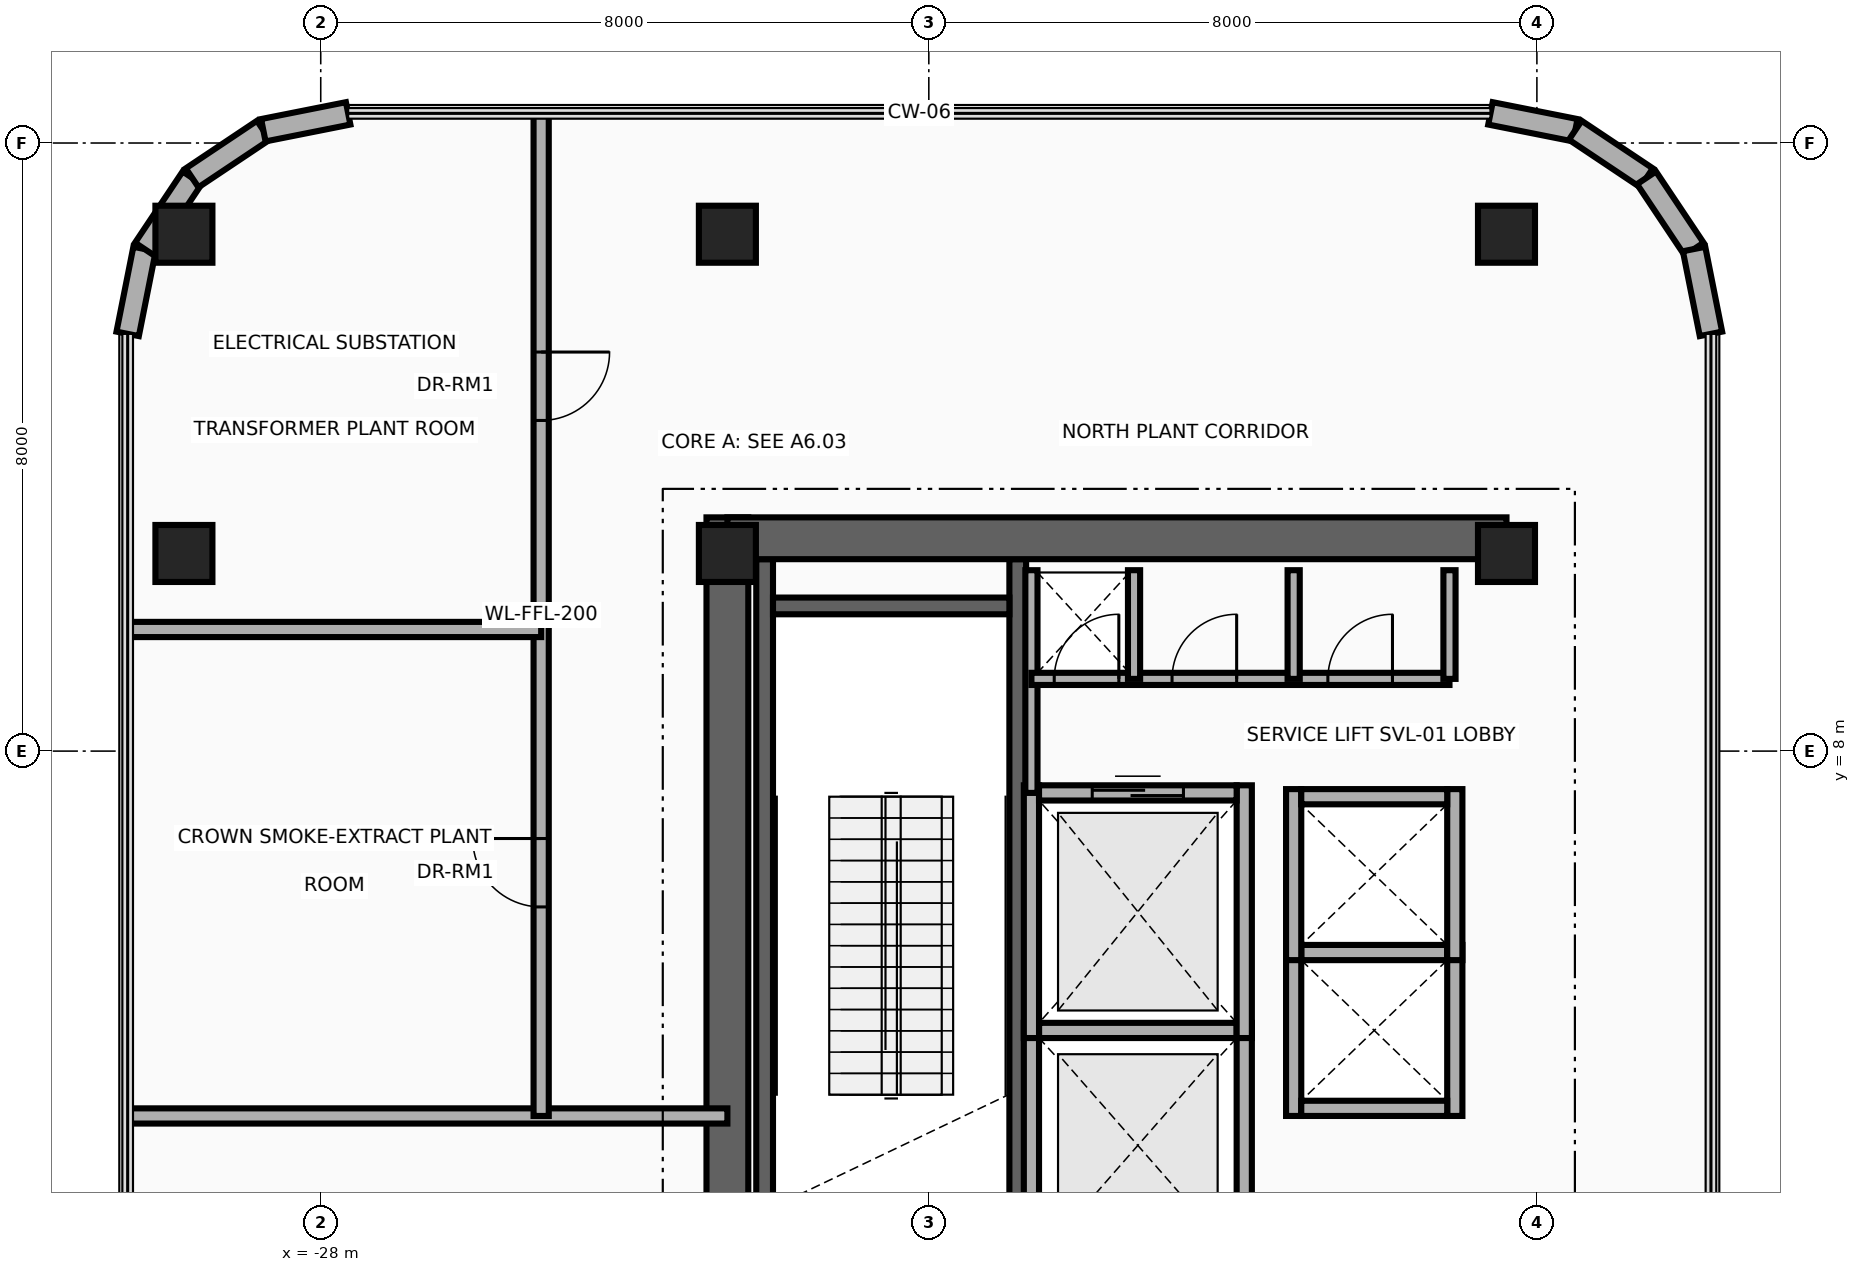
"""IFC4 building model, lengths in metres.
Left out: names, types, materials, properties, quantities, classifications, styles, units other than length and angle.
Written with IfcOpenShell. Run it as: python <this file> out.ifc"""

import sys

from ifc_helpers import new_model, si_unit, direction, frame, frame_2d, origin, origin_2d, place, context, subcontext, project, spatial, rectangle, extrude, source, transform, mapped, element, fill, save


model = new_model("IFC4")
c1 = context("Model", 3, precision=1e-05, world=origin(), true_north=direction((0.0, 1.0)))
c2 = subcontext(c1, "Body", "Model", "MODEL_VIEW")
j1 = project(units=[si_unit("LENGTHUNIT", "METRE"), si_unit("PLANEANGLEUNIT", "RADIAN")], contexts=[c1])
p1 = place(None, origin())
s1 = spatial("IfcSite", under=j1, at=p1, CompositionType="ELEMENT")
p2 = place(p1, origin())
s2 = spatial("IfcBuilding", under=s1, at=p2, CompositionType="ELEMENT")
p3 = place(p2, frame((0.0, 0.0, 294.2)))
s3 = spatial("IfcBuildingStorey", under=s2, at=p3, CompositionType="ELEMENT", Elevation=294.2)
for number, where, z_axis, x_axis in (
    (1, (-22.16, 1.78, 0.0), (0.0, 0.0, 1.0), (0.0, 1.0, 0.0)),
    (2, (-18.83, 1.78, 0.0), (0.0, 0.0, 1.0), (0.0, 1.0, 0.0)),
):
    element("IfcWall", number, at=place(p3, frame(where, z_axis=z_axis, x_axis=x_axis)), inside=s3, PredefinedType="SHEAR", context=c2, shape_type="SweptSolid", body=[
        extrude(rectangle(XDim=8.745, YDim=0.22, at=frame_2d((4.373, 0.0))), origin(), (0.0, 0.0, 1.0), 4.96),
    ])
p4 = place(p3, frame((-22.05, 9.91, 0.0), z_axis=(0.0, 0.0, 1.0), x_axis=(1.0, 0.0, 0.0)))
e3 = element("IfcWall", 3, at=p4, inside=s3, PredefinedType="SHEAR", context=c2, shape_type="SweptSolid", body=[
    extrude(rectangle(XDim=3.11, YDim=0.22, at=frame_2d((1.555, 0.0))), origin(), (0.0, 0.0, 1.0), 4.96),
])
p5 = place(p3, frame((-22.65, -11.075, 0.0), z_axis=(0.0, 0.0, 1.0), x_axis=(0.0, 1.0, 0.0)))
e4 = element("IfcWall", 4, at=p5, inside=s3, PredefinedType="SHEAR", context=c2, shape_type="SweptSolid", body=[
    extrude(rectangle(XDim=22.15, YDim=0.55, at=frame_2d((11.075, 0.0))), origin(), (0.0, 0.0, 1.0), 4.96),
])
p6 = place(p3, frame((-22.65, 10.8, 0.0), z_axis=(0.0, 0.0, 1.0), x_axis=(1.0, 0.0, 0.0)))
e5 = element("IfcWall", 5, at=p6, inside=s3, PredefinedType="SHEAR", context=c2, shape_type="SweptSolid", body=[
    extrude(rectangle(XDim=10.25, YDim=0.55, at=frame_2d((5.125, 0.0))), origin(), (0.0, 0.0, 1.0), 4.96),
])
m1 = source(origin(), c2, "Body", "SweptSolid", [
    extrude(rectangle(XDim=0.75, YDim=0.75, at=origin_2d()), origin(), (0.0, 0.0, 1.0), 5.2),
])
for number, where, z_axis, x_axis in (
    (6, (-29.8, 10.6, 0.0), (0.0, 0.0, 1.0), (1.0, 0.0, 0.0)),
    (7, (-22.65, 10.6, 0.0), (0.0, 0.0, 1.0), (1.0, 0.0, 0.0)),
    (8, (-12.4, 10.6, 0.0), (0.0, 0.0, 1.0), (1.0, 0.0, 0.0)),
    (9, (-29.8, 14.8, 0.0), (0.0, 0.0, 1.0), (1.0, 0.0, 0.0)),
    (10, (-22.65, 14.8, 0.0), (0.0, 0.0, 1.0), (1.0, 0.0, 0.0)),
    (11, (-12.4, 14.8, 0.0), (0.0, 0.0, 1.0), (1.0, 0.0, 0.0)),
):
    element("IfcColumn", number, at=place(p3, frame(where, z_axis=z_axis, x_axis=x_axis)), inside=s3, PredefinedType="COLUMN", context=c2, shape_type="MappedRepresentation", body=[
        mapped(m1, transform((0.0, 0.0, 0.0), x_axis=(1.0, 0.0, 0.0), y_axis=(0.0, 1.0, 0.0), z_axis=(0.0, 0.0, 1.0), scale=1.0)),
    ])
p7 = place(p3, frame((-30.54, 13.489, 0.0), z_axis=(0.0, 0.0, 1.0), x_axis=(0.195043173023, 0.980794657743, 0.0)))
e12 = element("IfcWall", 12, at=p7, inside=s3, PredefinedType="SOLIDWALL", context=c2, shape_type="SweptSolid", body=[
    extrude(rectangle(XDim=1.138, YDim=0.3, at=frame_2d((0.569, 0.0))), origin(), (0.0, 0.0, 1.0), 4.96),
])
for number, where, z_axis, x_axis in (
    (13, (-30.318, 14.605, 0.0), (0.0, 0.0, 1.0), (0.556, 0.831, 0.0)),
    (14, (-29.692, 15.542, 0.0), (0.0, 0.0, 1.0), (0.831, 0.556, 0.0)),
):
    element("IfcWall", number, at=place(p3, frame(where, z_axis=z_axis, x_axis=x_axis)), inside=s3, PredefinedType="SOLIDWALL", context=c2, shape_type="SweptSolid", body=[
        extrude(rectangle(XDim=1.127, YDim=0.3, at=frame_2d((0.563, 0.0))), origin(), (0.0, 0.0, 1.0), 4.96),
    ])
for number, where, z_axis, x_axis in (
    (15, (-28.755, 16.168, 0.0), (0.0, 0.0, 1.0), (0.981, 0.195, 0.0)),
    (16, (-12.611, 16.39, 0.0), (0.0, 0.0, 1.0), (0.981, -0.195, 0.0)),
):
    element("IfcWall", number, at=place(p3, frame(where, z_axis=z_axis, x_axis=x_axis)), inside=s3, PredefinedType="SOLIDWALL", context=c2, shape_type="SweptSolid", body=[
        extrude(rectangle(XDim=1.138, YDim=0.3, at=frame_2d((0.569, 0.0))), origin(), (0.0, 0.0, 1.0), 4.96),
    ])
for number, where, z_axis, x_axis in (
    (17, (-11.495, 16.168, 0.0), (0.0, 0.0, 1.0), (0.831, -0.556, 0.0)),
    (18, (-10.558, 15.542, 0.0), (0.0, 0.0, 1.0), (0.556, -0.831, 0.0)),
):
    element("IfcWall", number, at=place(p3, frame(where, z_axis=z_axis, x_axis=x_axis)), inside=s3, PredefinedType="SOLIDWALL", context=c2, shape_type="SweptSolid", body=[
        extrude(rectangle(XDim=1.127, YDim=0.3, at=frame_2d((0.563, 0.0))), origin(), (0.0, 0.0, 1.0), 4.96),
    ])
p8 = place(p3, frame((-9.932, 14.605, 0.0), z_axis=(0.0, 0.0, 1.0), x_axis=(0.195043173023, -0.980794657743, 0.0)))
e19 = element("IfcWall", 19, at=p8, inside=s3, PredefinedType="SOLIDWALL", context=c2, shape_type="SweptSolid", body=[
    extrude(rectangle(XDim=1.138, YDim=0.3, at=frame_2d((0.569, 0.0))), origin(), (0.0, 0.0, 1.0), 4.96),
])
for number, where, z_axis, x_axis in (
    (20, (-18.65, 1.2, 0.0), (0.0, 0.0, 1.0), (0.0, 1.0, 0.0)),
    (21, (-15.85, 1.2, 0.0), (0.0, 0.0, 1.0), (0.0, 1.0, 0.0)),
):
    element("IfcWall", number, at=place(p3, frame(where, z_axis=z_axis, x_axis=x_axis)), inside=s3, PredefinedType="MOVABLE", context=c2, shape_type="SweptSolid", body=[
        extrude(rectangle(XDim=3.225, YDim=0.2, at=frame_2d((1.613, 0.0))), origin(), (0.0, 0.0, 1.0), 4.96),
    ])
p9 = place(p3, frame((-18.55, 4.325, 0.0), z_axis=(0.0, 0.0, 1.0), x_axis=(1.0, 0.0, 0.0)))
e22 = element("IfcWall", 22, at=p9, inside=s3, PredefinedType="MOVABLE", context=c2, shape_type="SweptSolid", body=[
    extrude(rectangle(XDim=2.6, YDim=0.2, at=frame_2d((1.3, 0.0))), origin(), (0.0, 0.0, 1.0), 4.96),
])
for number, where, z_axis, x_axis in (
    (23, (-18.65, 4.225, 0.0), (0.0, 0.0, 1.0), (0.0, 1.0, 0.0)),
    (24, (-15.85, 4.225, 0.0), (0.0, 0.0, 1.0), (0.0, 1.0, 0.0)),
):
    element("IfcWall", number, at=place(p3, frame(where, z_axis=z_axis, x_axis=x_axis)), inside=s3, PredefinedType="MOVABLE", context=c2, shape_type="SweptSolid", body=[
        extrude(rectangle(XDim=3.325, YDim=0.2, at=frame_2d((1.663, 0.0))), origin(), (0.0, 0.0, 1.0), 4.96),
    ])
p10 = place(p3, frame((-18.55, 7.45, 0.0), z_axis=(0.0, 0.0, 1.0), x_axis=(1.0, 0.0, 0.0)))
e25 = element("IfcWall", 25, at=p10, inside=s3, PredefinedType="MOVABLE", context=c2, shape_type="SweptSolid", body=[
    extrude(rectangle(XDim=2.6, YDim=0.2, at=frame_2d((1.3, 0.0))), origin(), (0.0, 0.0, 1.0), 4.96),
])
p11 = place(p10, frame((0.7, 0.0, 0.0)))
e26 = element("IfcOpeningElement", 26, at=p11, cuts=e25, PredefinedType="OPENING", context=c2, shape_type="SweptSolid", body=[
    extrude(rectangle(XDim=1.2, YDim=2.1, at=frame_2d((0.6, 1.05))), frame((0.0, 0.115, 0.0), z_axis=(0.0, -1.0, 0.0), x_axis=(1.0, 0.0, 0.0)), (0.0, 0.0, 1.0), 0.23),
])
for number, where, z_axis, x_axis in (
    (27, (-15.2, 3.2, 0.0), (0.0, 0.0, 1.0), (0.0, 1.0, 0.0)),
    (28, (-13.08, 3.2, 0.0), (0.0, 0.0, 1.0), (0.0, 1.0, 0.0)),
):
    element("IfcWall", number, at=place(p3, frame(where, z_axis=z_axis, x_axis=x_axis)), inside=s3, PredefinedType="MOVABLE", context=c2, shape_type="SweptSolid", body=[
        extrude(rectangle(XDim=2.25, YDim=0.2, at=frame_2d((1.125, 0.0))), origin(), (0.0, 0.0, 1.0), 4.96),
    ])
for number, where, z_axis, x_axis in (
    (29, (-15.1, 3.3, 0.0), (0.0, 0.0, 1.0), (1.0, 0.0, 0.0)),
    (30, (-15.1, 5.35, 0.0), (0.0, 0.0, 1.0), (1.0, 0.0, 0.0)),
):
    element("IfcWall", number, at=place(p3, frame(where, z_axis=z_axis, x_axis=x_axis)), inside=s3, PredefinedType="MOVABLE", context=c2, shape_type="SweptSolid", body=[
        extrude(rectangle(XDim=1.92, YDim=0.2, at=frame_2d((0.96, 0.0))), origin(), (0.0, 0.0, 1.0), 4.96),
    ])
for number, where, z_axis, x_axis in (
    (31, (-15.2, 5.25, 0.0), (0.0, 0.0, 1.0), (0.0, 1.0, 0.0)),
    (32, (-13.08, 5.25, 0.0), (0.0, 0.0, 1.0), (0.0, 1.0, 0.0)),
):
    element("IfcWall", number, at=place(p3, frame(where, z_axis=z_axis, x_axis=x_axis)), inside=s3, PredefinedType="MOVABLE", context=c2, shape_type="SweptSolid", body=[
        extrude(rectangle(XDim=2.25, YDim=0.2, at=frame_2d((1.125, 0.0))), origin(), (0.0, 0.0, 1.0), 4.96),
    ])
p12 = place(p3, frame((-15.1, 7.4, 0.0), z_axis=(0.0, 0.0, 1.0), x_axis=(1.0, 0.0, 0.0)))
e33 = element("IfcWall", 33, at=p12, inside=s3, PredefinedType="MOVABLE", context=c2, shape_type="SweptSolid", body=[
    extrude(rectangle(XDim=1.92, YDim=0.2, at=frame_2d((0.96, 0.0))), origin(), (0.0, 0.0, 1.0), 4.96),
])
p13 = place(p3, frame((-18.65, 7.45, 0.0), z_axis=(0.0, 0.0, 1.0), x_axis=(0.0, 1.0, 0.0)))
e34 = element("IfcWall", 34, at=p13, inside=s3, PredefinedType="PARTITIONING", context=c2, shape_type="SweptSolid", body=[
    extrude(rectangle(XDim=2.93, YDim=0.16, at=frame_2d((1.465, 0.0))), origin(), (0.0, 0.0, 1.0), 4.96),
])
p14 = place(p3, frame((-18.65, 8.95, 0.0), z_axis=(0.0, 0.0, 1.0), x_axis=(1.0, 0.0, 0.0)))
e35 = element("IfcWall", 35, at=p14, inside=s3, PredefinedType="PARTITIONING", context=c2, shape_type="SweptSolid", body=[
    extrude(rectangle(XDim=5.5, YDim=0.16, at=frame_2d((2.75, 0.0))), origin(), (0.0, 0.0, 1.0), 4.96),
])
p15 = place(p14, frame((0.3, 0.0, 0.0)))
e36 = element("IfcOpeningElement", 36, at=p15, cuts=e35, PredefinedType="OPENING", context=c2, shape_type="SweptSolid", body=[
    extrude(rectangle(XDim=0.85, YDim=2.05, at=frame_2d((0.425, 1.025))), frame((0.0, 0.095, 0.0), z_axis=(0.0, -1.0, 0.0), x_axis=(1.0, 0.0, 0.0)), (0.0, 0.0, 1.0), 0.19),
])
p16 = place(p14, frame((1.85, 0.0, 0.0)))
e37 = element("IfcOpeningElement", 37, at=p16, cuts=e35, PredefinedType="OPENING", context=c2, shape_type="SweptSolid", body=[
    extrude(rectangle(XDim=0.85, YDim=2.05, at=frame_2d((0.425, 1.025))), frame((0.0, 0.095, 0.0), z_axis=(0.0, -1.0, 0.0), x_axis=(1.0, 0.0, 0.0)), (0.0, 0.0, 1.0), 0.19),
])
p17 = place(p14, frame((3.9, 0.0, 0.0)))
e38 = element("IfcOpeningElement", 38, at=p17, cuts=e35, PredefinedType="OPENING", context=c2, shape_type="SweptSolid", body=[
    extrude(rectangle(XDim=0.85, YDim=2.05, at=frame_2d((0.425, 1.025))), frame((0.0, 0.095, 0.0), z_axis=(0.0, -1.0, 0.0), x_axis=(1.0, 0.0, 0.0)), (0.0, 0.0, 1.0), 0.19),
])
for number, where, z_axis, x_axis in (
    (39, (-13.15, 8.95, 0.0), (0.0, 0.0, 1.0), (0.0, 1.0, 0.0)),
    (40, (-17.3, 8.95, 0.0), (0.0, 0.0, 1.0), (0.0, 1.0, 0.0)),
    (41, (-15.2, 8.95, 0.0), (0.0, 0.0, 1.0), (0.0, 1.0, 0.0)),
):
    element("IfcWall", number, at=place(p3, frame(where, z_axis=z_axis, x_axis=x_axis)), inside=s3, PredefinedType="PARTITIONING", context=c2, shape_type="SweptSolid", body=[
        extrude(rectangle(XDim=1.43, YDim=0.16, at=frame_2d((0.715, 0.0))), origin(), (0.0, 0.0, 1.0), 4.96),
    ])
p18 = place(p3, frame((-30.54, 3.2, 0.0), z_axis=(0.0, 0.0, 1.0), x_axis=(1.0, 0.0, 0.0)))
e42 = element("IfcWall", 42, at=p18, inside=s3, PredefinedType="PARTITIONING", context=c2, shape_type="SweptSolid", body=[
    extrude(rectangle(XDim=7.89, YDim=0.2, at=frame_2d((3.945, 0.0))), origin(), (0.0, 0.0, 1.0), 4.334),
])
p19 = place(p3, frame((-25.1, 3.2, 0.0), z_axis=(0.0, 0.0, 1.0), x_axis=(0.0, 1.0, 0.0)))
e43 = element("IfcWall", 43, at=p19, inside=s3, PredefinedType="PARTITIONING", context=c2, shape_type="SweptSolid", body=[
    extrude(rectangle(XDim=13.19, YDim=0.2, at=frame_2d((6.595, 0.0))), origin(), (0.0, 0.0, 1.0), 4.323),
])
p20 = place(p19, frame((2.75, 0.0, 0.0)))
e44 = element("IfcOpeningElement", 44, at=p20, cuts=e43, PredefinedType="OPENING", context=c2, shape_type="SweptSolid", body=[
    extrude(rectangle(XDim=0.9, YDim=2.1, at=frame_2d((0.45, 1.05))), frame((0.0, 0.115, 0.0), z_axis=(0.0, -1.0, 0.0), x_axis=(1.0, 0.0, 0.0)), (0.0, 0.0, 1.0), 0.23),
])
p21 = place(p19, frame((9.15, 0.0, 0.0)))
e45 = element("IfcOpeningElement", 45, at=p21, cuts=e43, PredefinedType="OPENING", context=c2, shape_type="SweptSolid", body=[
    extrude(rectangle(XDim=0.9, YDim=2.1, at=frame_2d((0.45, 1.05))), frame((0.0, 0.115, 0.0), z_axis=(0.0, -1.0, 0.0), x_axis=(1.0, 0.0, 0.0)), (0.0, 0.0, 1.0), 0.23),
])
p22 = place(p3, frame((-30.54, 9.6, 0.0), z_axis=(0.0, 0.0, 1.0), x_axis=(1.0, 0.0, 0.0)))
e46 = element("IfcWall", 46, at=p22, inside=s3, PredefinedType="PARTITIONING", context=c2, shape_type="SweptSolid", body=[
    extrude(rectangle(XDim=5.44, YDim=0.2, at=frame_2d((2.72, 0.0))), origin(), (0.0, 0.0, 1.0), 4.406),
])
p23 = place(p11, origin())
e47 = element("IfcDoor", 47, at=p23, inside=s3, OperationType="DOUBLE_DOOR_SLIDING", PredefinedType="DOOR", context=c2, shape_type="SweptSolid", body=[
    extrude(rectangle(XDim=1.2, YDim=2.1, at=frame_2d((0.6, 1.05))), frame((0.0, 0.025, 0.0), z_axis=(0.0, -1.0, 0.0), x_axis=(1.0, 0.0, 0.0)), (0.0, 0.0, 1.0), 0.05),
])
fill(e26, e47)
p24 = place(p15, origin())
e48 = element("IfcDoor", 48, at=p24, inside=s3, OperationType="SINGLE_SWING_LEFT", PredefinedType="DOOR", context=c2, shape_type="SweptSolid", body=[
    extrude(rectangle(XDim=0.85, YDim=2.05, at=frame_2d((0.425, 1.025))), frame((0.0, 0.025, 0.0), z_axis=(0.0, -1.0, 0.0), x_axis=(1.0, 0.0, 0.0)), (0.0, 0.0, 1.0), 0.05),
])
fill(e36, e48)
p25 = place(p16, origin())
e49 = element("IfcDoor", 49, at=p25, inside=s3, OperationType="SINGLE_SWING_RIGHT", PredefinedType="DOOR", context=c2, shape_type="SweptSolid", body=[
    extrude(rectangle(XDim=0.85, YDim=2.05, at=frame_2d((0.425, 1.025))), frame((0.0, 0.025, 0.0), z_axis=(0.0, -1.0, 0.0), x_axis=(1.0, 0.0, 0.0)), (0.0, 0.0, 1.0), 0.05),
])
fill(e37, e49)
p26 = place(p17, origin())
e50 = element("IfcDoor", 50, at=p26, inside=s3, OperationType="SINGLE_SWING_LEFT", PredefinedType="DOOR", context=c2, shape_type="SweptSolid", body=[
    extrude(rectangle(XDim=0.85, YDim=2.05, at=frame_2d((0.425, 1.025))), frame((0.0, 0.025, 0.0), z_axis=(0.0, -1.0, 0.0), x_axis=(1.0, 0.0, 0.0)), (0.0, 0.0, 1.0), 0.05),
])
fill(e38, e50)
p27 = place(p20, origin())
e51 = element("IfcDoor", 51, at=p27, inside=s3, OperationType="SINGLE_SWING_RIGHT", PredefinedType="DOOR", context=c2, shape_type="SweptSolid", body=[
    extrude(rectangle(XDim=0.9, YDim=2.1, at=frame_2d((0.45, 1.05))), frame((0.0, 0.025, 0.0), z_axis=(0.0, -1.0, 0.0), x_axis=(1.0, 0.0, 0.0)), (0.0, 0.0, 1.0), 0.05),
])
fill(e44, e51)
p28 = place(p21, frame((0.9, 0.0, 0.0), z_axis=(0.0, 0.0, 1.0), x_axis=(-1.0, 0.0, 0.0)))
e52 = element("IfcDoor", 52, at=p28, inside=s3, OperationType="SINGLE_SWING_LEFT", PredefinedType="DOOR", context=c2, shape_type="SweptSolid", body=[
    extrude(rectangle(XDim=0.9, YDim=2.1, at=frame_2d((0.45, 1.05))), frame((0.0, 0.025, 0.0), z_axis=(0.0, -1.0, 0.0), x_axis=(1.0, 0.0, 0.0)), (0.0, 0.0, 1.0), 0.05),
])
fill(e45, e52)
save(model, sys.argv[1])
